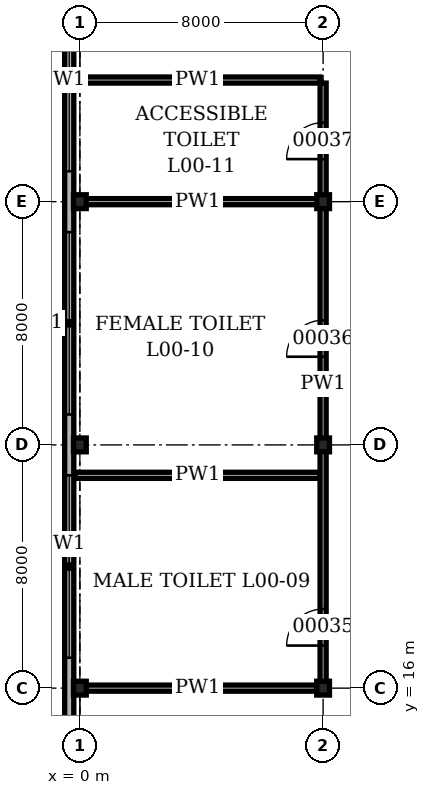
"""IFC4 building model, lengths in metres.
Left out: names, types, materials, properties, quantities, classifications, styles, units other than length and angle.
Written with IfcOpenShell. Run it as: python <this file> out.ifc"""

import sys

from ifc_helpers import new_model, si_unit, direction, frame, frame_2d, origin, origin_2d, place, context, subcontext, project, spatial, rectangle, i_section, extrude, element, fill, save


model = new_model("IFC4")
c1 = context("Model", 3, precision=1e-05, world=origin(), true_north=direction((0.0, 1.0)))
c2 = subcontext(c1, "Body", "Model", "MODEL_VIEW")
j1 = project(units=[si_unit("LENGTHUNIT", "METRE"), si_unit("PLANEANGLEUNIT", "RADIAN")], contexts=[c1])
p1 = place(None, origin())
s1 = spatial("IfcSite", under=j1, at=p1, CompositionType="ELEMENT")
p2 = place(p1, origin())
s2 = spatial("IfcBuilding", under=s1, at=p2, CompositionType="ELEMENT")
p3 = place(p2, origin())
s3 = spatial("IfcBuildingStorey", under=s2, at=p3, CompositionType="ELEMENT", Elevation=0.0)
for number, where, z_axis, x_axis in (
    (1, (0.0, 16.0, 0.0), (0.0, 0.0, 1.0), (1.0, 0.0, 0.0)),
    (2, (0.0, 24.0, 0.0), (0.0, 0.0, 1.0), (1.0, 0.0, 0.0)),
    (3, (0.0, 32.0, 0.0), (0.0, 0.0, 1.0), (1.0, 0.0, 0.0)),
    (4, (8.0, 16.0, 0.0), (0.0, 0.0, 1.0), (1.0, 0.0, 0.0)),
    (5, (8.0, 24.0, 0.0), (0.0, 0.0, 1.0), (1.0, 0.0, 0.0)),
    (6, (8.0, 32.0, 0.0), (0.0, 0.0, 1.0), (1.0, 0.0, 0.0)),
):
    element("IfcColumn", number, at=place(p3, frame(where, z_axis=z_axis, x_axis=x_axis)), inside=s3, PredefinedType="COLUMN", context=c2, shape_type="SweptSolid", body=[
        extrude(i_section(OverallWidth=0.419, OverallDepth=0.455, WebThickness=0.042, FlangeThickness=0.068, at=origin_2d()), origin(), (0.0, 0.0, 1.0), 4.9),
    ])
p4 = place(p3, frame((-0.35, 112.35, 0.0), z_axis=(0.0, 0.0, 1.0), x_axis=(0.0, -1.0, 0.0)))
e7 = element("IfcWall", 7, at=p4, inside=s3, PredefinedType="SOLIDWALL", context=c2, shape_type="SweptSolid", body=[
    extrude(rectangle(XDim=112.7, YDim=0.3, at=frame_2d((56.35, 0.0))), origin(), (0.0, 0.0, 1.0), 4.9),
])
p5 = place(p4, frame((3.45, 0.0, 0.0)))
e8 = element("IfcOpeningElement", 8, at=p5, cuts=e7, PredefinedType="OPENING", context=c2, shape_type="SweptSolid", body=[
    extrude(rectangle(XDim=1.8, YDim=2.4, at=frame_2d((0.9, 1.2))), frame((0.0, 0.16, 0.0), z_axis=(0.0, -1.0, 0.0), x_axis=(1.0, 0.0, 0.0)), (0.0, 0.0, 1.0), 0.32),
])
p6 = place(p4, frame((9.35, 0.0, 1.2)))
e9 = element("IfcOpeningElement", 9, at=p6, cuts=e7, PredefinedType="OPENING", context=c2, shape_type="SweptSolid", body=[
    extrude(rectangle(XDim=6.0, YDim=1.5, at=frame_2d((3.0, 0.75))), frame((0.0, 0.16, 0.0), z_axis=(0.0, -1.0, 0.0), x_axis=(1.0, 0.0, 0.0)), (0.0, 0.0, 1.0), 0.32),
])
p7 = place(p4, frame((17.35, 0.0, 1.2)))
e10 = element("IfcOpeningElement", 10, at=p7, cuts=e7, PredefinedType="OPENING", context=c2, shape_type="SweptSolid", body=[
    extrude(rectangle(XDim=6.0, YDim=1.5, at=frame_2d((3.0, 0.75))), frame((0.0, 0.16, 0.0), z_axis=(0.0, -1.0, 0.0), x_axis=(1.0, 0.0, 0.0)), (0.0, 0.0, 1.0), 0.32),
])
p8 = place(p4, frame((25.35, 0.0, 1.2)))
e11 = element("IfcOpeningElement", 11, at=p8, cuts=e7, PredefinedType="OPENING", context=c2, shape_type="SweptSolid", body=[
    extrude(rectangle(XDim=6.0, YDim=1.5, at=frame_2d((3.0, 0.75))), frame((0.0, 0.16, 0.0), z_axis=(0.0, -1.0, 0.0), x_axis=(1.0, 0.0, 0.0)), (0.0, 0.0, 1.0), 0.32),
])
p9 = place(p4, frame((33.35, 0.0, 1.2)))
e12 = element("IfcOpeningElement", 12, at=p9, cuts=e7, PredefinedType="OPENING", context=c2, shape_type="SweptSolid", body=[
    extrude(rectangle(XDim=6.0, YDim=1.5, at=frame_2d((3.0, 0.75))), frame((0.0, 0.16, 0.0), z_axis=(0.0, -1.0, 0.0), x_axis=(1.0, 0.0, 0.0)), (0.0, 0.0, 1.0), 0.32),
])
p10 = place(p4, frame((41.15, 0.0, 0.0)))
e13 = element("IfcOpeningElement", 13, at=p10, cuts=e7, PredefinedType="OPENING", context=c2, shape_type="SweptSolid", body=[
    extrude(rectangle(XDim=2.4, YDim=3.0, at=frame_2d((1.2, 1.5))), frame((0.0, 0.16, 0.0), z_axis=(0.0, -1.0, 0.0), x_axis=(1.0, 0.0, 0.0)), (0.0, 0.0, 1.0), 0.32),
])
p11 = place(p4, frame((45.15, 0.0, 0.0)))
e14 = element("IfcOpeningElement", 14, at=p11, cuts=e7, PredefinedType="OPENING", context=c2, shape_type="SweptSolid", body=[
    extrude(rectangle(XDim=2.4, YDim=3.0, at=frame_2d((1.2, 1.5))), frame((0.0, 0.16, 0.0), z_axis=(0.0, -1.0, 0.0), x_axis=(1.0, 0.0, 0.0)), (0.0, 0.0, 1.0), 0.32),
])
p12 = place(p4, frame((49.35, 0.0, 1.2)))
e15 = element("IfcOpeningElement", 15, at=p12, cuts=e7, PredefinedType="OPENING", context=c2, shape_type="SweptSolid", body=[
    extrude(rectangle(XDim=6.0, YDim=1.5, at=frame_2d((3.0, 0.75))), frame((0.0, 0.16, 0.0), z_axis=(0.0, -1.0, 0.0), x_axis=(1.0, 0.0, 0.0)), (0.0, 0.0, 1.0), 0.32),
])
p13 = place(p4, frame((57.45, 0.0, 0.0)))
e16 = element("IfcOpeningElement", 16, at=p13, cuts=e7, PredefinedType="OPENING", context=c2, shape_type="SweptSolid", body=[
    extrude(rectangle(XDim=1.8, YDim=2.4, at=frame_2d((0.9, 1.2))), frame((0.0, 0.16, 0.0), z_axis=(0.0, -1.0, 0.0), x_axis=(1.0, 0.0, 0.0)), (0.0, 0.0, 1.0), 0.32),
])
p14 = place(p4, frame((61.45, 0.0, 0.0)))
e17 = element("IfcOpeningElement", 17, at=p14, cuts=e7, PredefinedType="OPENING", context=c2, shape_type="SweptSolid", body=[
    extrude(rectangle(XDim=1.8, YDim=2.4, at=frame_2d((0.9, 1.2))), frame((0.0, 0.16, 0.0), z_axis=(0.0, -1.0, 0.0), x_axis=(1.0, 0.0, 0.0)), (0.0, 0.0, 1.0), 0.32),
])
p15 = place(p4, frame((65.35, 0.0, 1.2)))
e18 = element("IfcOpeningElement", 18, at=p15, cuts=e7, PredefinedType="OPENING", context=c2, shape_type="SweptSolid", body=[
    extrude(rectangle(XDim=6.0, YDim=1.5, at=frame_2d((3.0, 0.75))), frame((0.0, 0.16, 0.0), z_axis=(0.0, -1.0, 0.0), x_axis=(1.0, 0.0, 0.0)), (0.0, 0.0, 1.0), 0.32),
])
p16 = place(p4, frame((73.35, 0.0, 1.2)))
e19 = element("IfcOpeningElement", 19, at=p16, cuts=e7, PredefinedType="OPENING", context=c2, shape_type="SweptSolid", body=[
    extrude(rectangle(XDim=6.0, YDim=1.5, at=frame_2d((3.0, 0.75))), frame((0.0, 0.16, 0.0), z_axis=(0.0, -1.0, 0.0), x_axis=(1.0, 0.0, 0.0)), (0.0, 0.0, 1.0), 0.32),
])
p17 = place(p4, frame((81.35, 0.0, 1.2)))
e20 = element("IfcOpeningElement", 20, at=p17, cuts=e7, PredefinedType="OPENING", context=c2, shape_type="SweptSolid", body=[
    extrude(rectangle(XDim=6.0, YDim=1.5, at=frame_2d((3.0, 0.75))), frame((0.0, 0.16, 0.0), z_axis=(0.0, -1.0, 0.0), x_axis=(1.0, 0.0, 0.0)), (0.0, 0.0, 1.0), 0.32),
])
p18 = place(p4, frame((89.35, 0.0, 1.2)))
e21 = element("IfcOpeningElement", 21, at=p18, cuts=e7, PredefinedType="OPENING", context=c2, shape_type="SweptSolid", body=[
    extrude(rectangle(XDim=6.0, YDim=1.5, at=frame_2d((3.0, 0.75))), frame((0.0, 0.16, 0.0), z_axis=(0.0, -1.0, 0.0), x_axis=(1.0, 0.0, 0.0)), (0.0, 0.0, 1.0), 0.32),
])
p19 = place(p4, frame((99.45, 0.0, 0.0)))
e22 = element("IfcOpeningElement", 22, at=p19, cuts=e7, PredefinedType="OPENING", context=c2, shape_type="SweptSolid", body=[
    extrude(rectangle(XDim=1.8, YDim=2.4, at=frame_2d((0.9, 1.2))), frame((0.0, 0.16, 0.0), z_axis=(0.0, -1.0, 0.0), x_axis=(1.0, 0.0, 0.0)), (0.0, 0.0, 1.0), 0.32),
])
p20 = place(p4, frame((107.45, 0.0, 0.0)))
e23 = element("IfcOpeningElement", 23, at=p20, cuts=e7, PredefinedType="OPENING", context=c2, shape_type="SweptSolid", body=[
    extrude(rectangle(XDim=1.8, YDim=2.4, at=frame_2d((0.9, 1.2))), frame((0.0, 0.16, 0.0), z_axis=(0.0, -1.0, 0.0), x_axis=(1.0, 0.0, 0.0)), (0.0, 0.0, 1.0), 0.32),
])
p21 = place(p3, frame((-0.15, 16.0, 0.0), z_axis=(0.0, 0.0, 1.0), x_axis=(1.0, 0.0, 0.0)))
e24 = element("IfcWall", 24, at=p21, inside=s3, PredefinedType="PARTITIONING", context=c2, shape_type="SweptSolid", body=[
    extrude(rectangle(XDim=8.05, YDim=0.2, at=frame_2d((4.025, 0.0))), origin(), (0.0, 0.0, 1.0), 3.928),
])
p22 = place(p3, frame((-0.15, 23.0, 0.0), z_axis=(0.0, 0.0, 1.0), x_axis=(1.0, 0.0, 0.0)))
e25 = element("IfcWall", 25, at=p22, inside=s3, PredefinedType="PARTITIONING", context=c2, shape_type="SweptSolid", body=[
    extrude(rectangle(XDim=8.05, YDim=0.2, at=frame_2d((4.025, 0.0))), origin(), (0.0, 0.0, 1.0), 4.7),
])
p23 = place(p3, frame((-0.15, 32.0, 0.0), z_axis=(0.0, 0.0, 1.0), x_axis=(1.0, 0.0, 0.0)))
e26 = element("IfcWall", 26, at=p23, inside=s3, PredefinedType="PARTITIONING", context=c2, shape_type="SweptSolid", body=[
    extrude(rectangle(XDim=8.05, YDim=0.2, at=frame_2d((4.025, 0.0))), origin(), (0.0, 0.0, 1.0), 3.928),
])
p24 = place(p3, frame((-0.15, 36.0, 0.0), z_axis=(0.0, 0.0, 1.0), x_axis=(1.0, 0.0, 0.0)))
e27 = element("IfcWall", 27, at=p24, inside=s3, PredefinedType="PARTITIONING", context=c2, shape_type="SweptSolid", body=[
    extrude(rectangle(XDim=8.05, YDim=0.2, at=frame_2d((4.025, 0.0))), origin(), (0.0, 0.0, 1.0), 4.7),
])
p25 = place(p3, frame((8.0, 16.1, 0.0), z_axis=(0.0, 0.0, 1.0), x_axis=(0.0, 1.0, 0.0)))
e28 = element("IfcWall", 28, at=p25, inside=s3, PredefinedType="PARTITIONING", context=c2, shape_type="SweptSolid", body=[
    extrude(rectangle(XDim=19.8, YDim=0.2, at=frame_2d((9.9, 0.0))), origin(), (0.0, 0.0, 1.0), 3.928),
])
p26 = place(p25, frame((1.3, 0.0, 0.0)))
e29 = element("IfcOpeningElement", 29, at=p26, cuts=e28, PredefinedType="OPENING", context=c2, shape_type="SweptSolid", body=[
    extrude(rectangle(XDim=1.2, YDim=2.1, at=frame_2d((0.6, 1.05))), frame((0.0, 0.11, 0.0), z_axis=(0.0, -1.0, 0.0), x_axis=(1.0, 0.0, 0.0)), (0.0, 0.0, 1.0), 0.22),
])
p27 = place(p25, frame((10.8, 0.0, 0.0)))
e30 = element("IfcOpeningElement", 30, at=p27, cuts=e28, PredefinedType="OPENING", context=c2, shape_type="SweptSolid", body=[
    extrude(rectangle(XDim=1.2, YDim=2.1, at=frame_2d((0.6, 1.05))), frame((0.0, 0.11, 0.0), z_axis=(0.0, -1.0, 0.0), x_axis=(1.0, 0.0, 0.0)), (0.0, 0.0, 1.0), 0.22),
])
p28 = place(p25, frame((17.3, 0.0, 0.0)))
e31 = element("IfcOpeningElement", 31, at=p28, cuts=e28, PredefinedType="OPENING", context=c2, shape_type="SweptSolid", body=[
    extrude(rectangle(XDim=1.2, YDim=2.1, at=frame_2d((0.6, 1.05))), frame((0.0, 0.11, 0.0), z_axis=(0.0, -1.0, 0.0), x_axis=(1.0, 0.0, 0.0)), (0.0, 0.0, 1.0), 0.22),
])
p29 = place(p16, origin())
e32 = element("IfcWindow", 32, at=p29, inside=s3, PartitioningType="SINGLE_PANEL", PredefinedType="WINDOW", context=c2, shape_type="SweptSolid", body=[
    extrude(rectangle(XDim=6.0, YDim=1.5, at=frame_2d((3.0, 0.75))), frame((0.0, 0.03, 0.0), z_axis=(0.0, -1.0, 0.0), x_axis=(1.0, 0.0, 0.0)), (0.0, 0.0, 1.0), 0.06),
])
fill(e19, e32)
p30 = place(p17, origin())
e33 = element("IfcWindow", 33, at=p30, inside=s3, PartitioningType="SINGLE_PANEL", PredefinedType="WINDOW", context=c2, shape_type="SweptSolid", body=[
    extrude(rectangle(XDim=6.0, YDim=1.5, at=frame_2d((3.0, 0.75))), frame((0.0, 0.03, 0.0), z_axis=(0.0, -1.0, 0.0), x_axis=(1.0, 0.0, 0.0)), (0.0, 0.0, 1.0), 0.06),
])
fill(e20, e33)
p31 = place(p18, origin())
e34 = element("IfcWindow", 34, at=p31, inside=s3, PartitioningType="SINGLE_PANEL", PredefinedType="WINDOW", context=c2, shape_type="SweptSolid", body=[
    extrude(rectangle(XDim=6.0, YDim=1.5, at=frame_2d((3.0, 0.75))), frame((0.0, 0.03, 0.0), z_axis=(0.0, -1.0, 0.0), x_axis=(1.0, 0.0, 0.0)), (0.0, 0.0, 1.0), 0.06),
])
fill(e21, e34)
p32 = place(p26, origin())
e35 = element("IfcDoor", 35, at=p32, inside=s3, OperationType="SINGLE_SWING_RIGHT", PredefinedType="DOOR", context=c2, shape_type="SweptSolid", body=[
    extrude(rectangle(XDim=1.2, YDim=2.1, at=frame_2d((0.6, 1.05))), frame((0.0, 0.1, 0.0), z_axis=(0.0, -1.0, 0.0), x_axis=(1.0, 0.0, 0.0)), (0.0, 0.0, 1.0), 0.199),
])
fill(e29, e35)
p33 = place(p27, origin())
e36 = element("IfcDoor", 36, at=p33, inside=s3, OperationType="SINGLE_SWING_RIGHT", PredefinedType="DOOR", context=c2, shape_type="SweptSolid", body=[
    extrude(rectangle(XDim=1.2, YDim=2.1, at=frame_2d((0.6, 1.05))), frame((0.0, 0.1, 0.0), z_axis=(0.0, -1.0, 0.0), x_axis=(1.0, 0.0, 0.0)), (0.0, 0.0, 1.0), 0.199),
])
fill(e30, e36)
p34 = place(p28, origin())
e37 = element("IfcDoor", 37, at=p34, inside=s3, OperationType="SINGLE_SWING_RIGHT", PredefinedType="DOOR", context=c2, shape_type="SweptSolid", body=[
    extrude(rectangle(XDim=1.2, YDim=2.1, at=frame_2d((0.6, 1.05))), frame((0.0, 0.1, 0.0), z_axis=(0.0, -1.0, 0.0), x_axis=(1.0, 0.0, 0.0)), (0.0, 0.0, 1.0), 0.199),
])
fill(e31, e37)
save(model, sys.argv[1])
